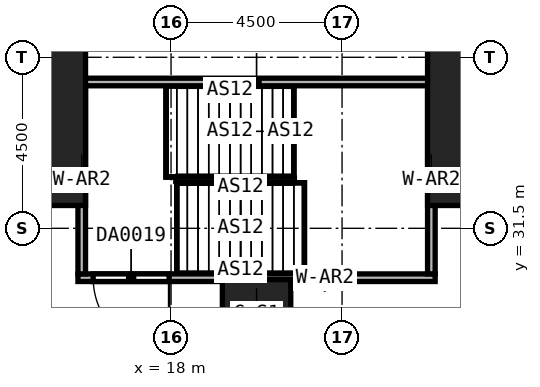
"""IFC4 building model, lengths in metres.
Left out: names, types, materials, properties, quantities, classifications, styles, units other than length and angle.
Written with IfcOpenShell. Run it as: python <this file> out.ifc"""

import sys

from ifc_helpers import new_model, si_unit, direction, frame, frame_2d, origin, origin_2d, place, context, subcontext, project, spatial, rectangle, extrude, element, fill, save


model = new_model("IFC4")
c1 = context("Model", 3, precision=1e-05, world=origin(), true_north=direction((0.0, 1.0)))
c2 = subcontext(c1, "Body", "Model", "MODEL_VIEW")
j1 = project(units=[si_unit("LENGTHUNIT", "METRE"), si_unit("PLANEANGLEUNIT", "RADIAN")], contexts=[c1])
p1 = place(None, origin())
s1 = spatial("IfcSite", under=j1, at=p1, CompositionType="ELEMENT")
p2 = place(p1, origin())
s2 = spatial("IfcBuilding", under=s1, at=p2, CompositionType="ELEMENT")
p3 = place(p2, origin())
s3 = spatial("IfcBuildingStorey", under=s2, at=p3, CompositionType="ELEMENT", Elevation=0.0)
for number, where, z_axis, x_axis in (
    (1, (13.5, 35.55, 0.0), (0.0, 0.0, 1.0), (1.0, 0.0, 0.0)),
    (2, (27.0, 35.55, 0.0), (0.0, 0.0, 1.0), (1.0, 0.0, 0.0)),
):
    element("IfcColumn", number, at=place(p3, frame(where, z_axis=z_axis, x_axis=x_axis)), inside=s3, PredefinedType="COLUMN", context=c2, shape_type="SweptSolid", body=[
        extrude(rectangle(XDim=4.5, YDim=6.9, at=origin_2d()), origin(), (0.0, 0.0, 1.0), 12.0),
    ])
p4 = place(p3, frame((20.25, 29.25, 0.0), z_axis=(0.0, 0.0, 1.0), x_axis=(1.0, 0.0, 0.0)))
e3 = element("IfcColumn", 3, at=p4, inside=s3, PredefinedType="COLUMN", context=c2, shape_type="SweptSolid", body=[
    extrude(rectangle(XDim=1.8, YDim=1.8, at=origin_2d()), origin(), (0.0, 0.0, 1.0), 12.0),
])
p5 = place(p3, frame((24.95, 30.2, 0.0), z_axis=(0.0, 0.0, 1.0), x_axis=(-1.0, 0.0, 0.0)))
e4 = element("IfcWall", 4, at=p5, inside=s3, PredefinedType="SOLIDWALL", context=c2, shape_type="SweptSolid", body=[
    extrude(rectangle(XDim=9.4, YDim=0.2, at=frame_2d((4.7, 0.0))), origin(), (0.0, 0.0, 1.0), 12.0),
])
p6 = place(p5, frame((7.0, 0.0, 0.0)))
e5 = element("IfcOpeningElement", 5, at=p6, cuts=e4, PredefinedType="OPENING", context=c2, shape_type="SweptSolid", body=[
    extrude(rectangle(XDim=2.0, YDim=2.4, at=frame_2d((1.0, 1.2))), frame((0.0, 0.1, 0.0), z_axis=(0.0, -1.0, 0.0), x_axis=(1.0, 0.0, 0.0)), (0.0, 0.0, 1.0), 0.2),
])
p7 = place(p3, frame((15.55, 35.35, 0.0), z_axis=(0.0, 0.0, 1.0), x_axis=(1.0, 0.0, 0.0)))
e6 = element("IfcWall", 6, at=p7, inside=s3, PredefinedType="SOLIDWALL", context=c2, shape_type="SweptSolid", body=[
    extrude(rectangle(XDim=9.4, YDim=0.2, at=frame_2d((4.7, 0.0))), origin(), (0.0, 0.0, 1.0), 12.0),
])
for number, where, z_axis, x_axis in (
    (7, (15.65, 30.3, 0.0), (0.0, 0.0, 1.0), (0.0, 1.0, 0.0)),
    (8, (24.85, 30.3, 0.0), (0.0, 0.0, 1.0), (0.0, 1.0, 0.0)),
):
    element("IfcWall", number, at=place(p3, frame(where, z_axis=z_axis, x_axis=x_axis)), inside=s3, PredefinedType="SOLIDWALL", context=c2, shape_type="SweptSolid", body=[
        extrude(rectangle(XDim=4.95, YDim=0.2, at=frame_2d((2.475, 0.0))), origin(), (0.0, 0.0, 1.0), 12.0),
    ])
p8 = place(p6, origin())
e9 = element("IfcDoor", 9, at=p8, inside=s3, OperationType="DOUBLE_DOOR_SINGLE_SWING", PredefinedType="DOOR", context=c2, shape_type="SweptSolid", body=[
    extrude(rectangle(XDim=2.0, YDim=2.4, at=frame_2d((1.0, 1.2))), frame((0.0, 0.025, 0.0), z_axis=(0.0, -1.0, 0.0), x_axis=(1.0, 0.0, 0.0)), (0.0, 0.0, 1.0), 0.05),
])
fill(e5, e9)
save(model, sys.argv[1])
